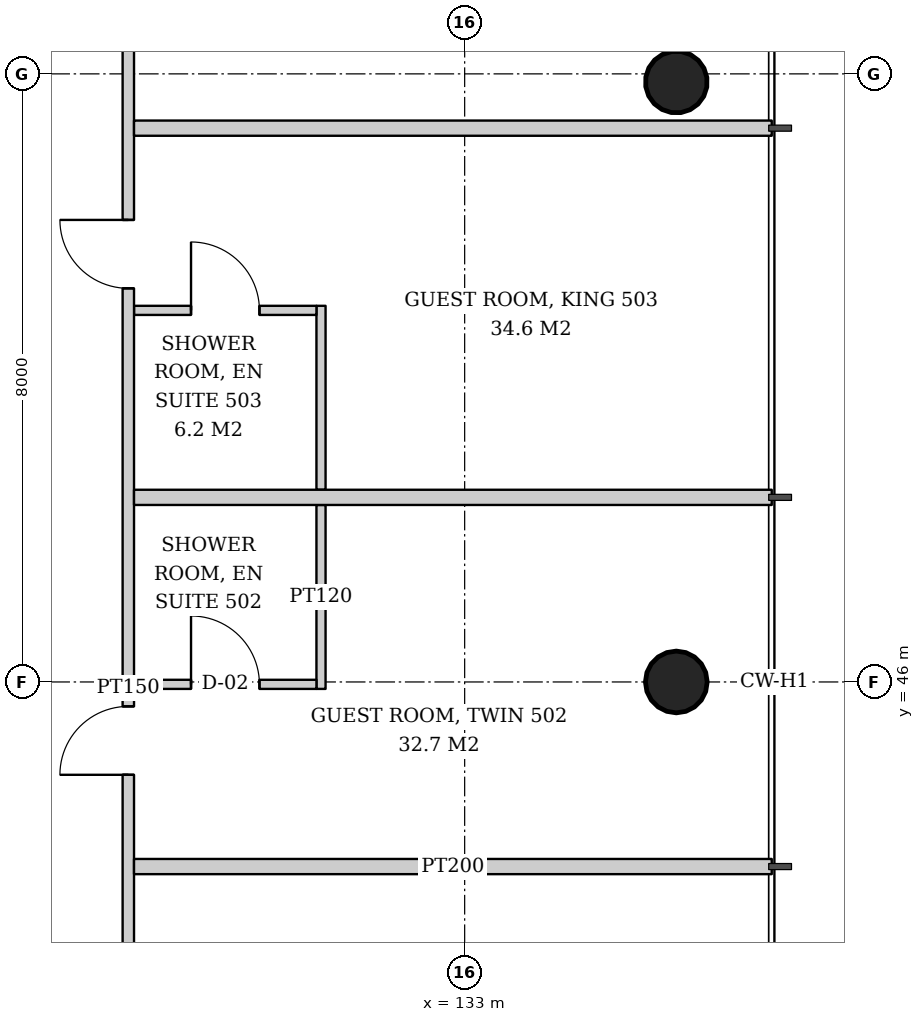
"""IFC4 building model, lengths in metres.
Left out: names, types, materials, properties, quantities, classifications, styles, units other than length and angle.
Written with IfcOpenShell. Run it as: python <this file> out.ifc"""

import sys

from ifc_helpers import new_model, si_unit, direction, frame, frame_2d, origin, origin_2d, place, context, subcontext, project, spatial, rectangle, hollow_circle, extrude, element, fill, save


model = new_model("IFC4")
c1 = context("Model", 3, precision=1e-05, world=origin(), true_north=direction((0.0, 1.0)))
c2 = subcontext(c1, "Body", "Model", "MODEL_VIEW")
j1 = project(units=[si_unit("LENGTHUNIT", "METRE"), si_unit("PLANEANGLEUNIT", "RADIAN")], contexts=[c1])
p1 = place(None, origin())
s1 = spatial("IfcSite", under=j1, at=p1, CompositionType="ELEMENT")
p2 = place(p1, origin())
s2 = spatial("IfcBuilding", under=s1, at=p2, CompositionType="ELEMENT")
p3 = place(p2, frame((0.0, 0.0, 24.8)))
s3 = spatial("IfcBuildingStorey", under=s2, at=p3, CompositionType="ELEMENT", Elevation=24.8)
p4 = place(p3, frame((135.836, 46.0, 0.0), z_axis=(-0.043069538298, 0.0, 0.999072076915), x_axis=(0.0, -1.0, 0.0)))
e1 = element("IfcColumn", 1, at=p4, inside=s3, PredefinedType="COLUMN", context=c2, shape_type="SweptSolid", body=[
    extrude(hollow_circle(Radius=0.406, WallThickness=0.03, at=origin_2d()), origin(), (0.0, 0.0, 1.0), 3.803),
])
p5 = place(p3, frame((135.836, 53.918, 0.0), z_axis=(-0.043059525333, -0.021561848751, 0.998839808957), x_axis=(0.44774654769, -0.894160516368, 0.0)))
e2 = element("IfcColumn", 2, at=p5, inside=s3, PredefinedType="COLUMN", context=c2, shape_type="SweptSolid", body=[
    extrude(hollow_circle(Radius=0.406, WallThickness=0.03, at=origin_2d()), origin(), (0.0, 0.0, 1.0), 3.804),
])
p6 = place(p3, frame((131.11, 45.909, 0.0), z_axis=(0.0, 0.0, 1.0), x_axis=(0.0, 1.0, 0.0)))
e3 = element("IfcWall", 3, at=p6, inside=s3, PredefinedType="PARTITIONING", context=c2, shape_type="SweptSolid", body=[
    extrude(rectangle(XDim=2.42, YDim=0.12, at=frame_2d((1.21, 0.0))), origin(), (0.0, 0.0, 1.0), 3.6),
])
p7 = place(p3, frame((128.65, 45.969, 0.0), z_axis=(0.0, 0.0, 1.0), x_axis=(1.0, 0.0, 0.0)))
e4 = element("IfcWall", 4, at=p7, inside=s3, PredefinedType="PARTITIONING", context=c2, shape_type="SweptSolid", body=[
    extrude(rectangle(XDim=2.4, YDim=0.12, at=frame_2d((1.2, 0.0))), origin(), (0.0, 0.0, 1.0), 3.6),
])
p8 = place(p7, frame((0.75, 0.0, 0.0)))
e5 = element("IfcOpeningElement", 5, at=p8, cuts=e4, PredefinedType="OPENING", context=c2, shape_type="SweptSolid", body=[
    extrude(rectangle(XDim=0.9, YDim=2.1, at=frame_2d((0.45, 1.05))), frame((0.0, 0.07, 0.0), z_axis=(0.0, -1.0, 0.0), x_axis=(1.0, 0.0, 0.0)), (0.0, 0.0, 1.0), 0.14),
])
p9 = place(p3, frame((131.11, 48.529, 0.0), z_axis=(0.0, 0.0, 1.0), x_axis=(0.0, 1.0, 0.0)))
e6 = element("IfcWall", 6, at=p9, inside=s3, PredefinedType="PARTITIONING", context=c2, shape_type="SweptSolid", body=[
    extrude(rectangle(XDim=2.42, YDim=0.12, at=frame_2d((1.21, 0.0))), origin(), (0.0, 0.0, 1.0), 2.847),
])
p10 = place(p3, frame((128.65, 50.889, 0.0), z_axis=(0.0, 0.0, 1.0), x_axis=(1.0, 0.0, 0.0)))
e7 = element("IfcWall", 7, at=p10, inside=s3, PredefinedType="PARTITIONING", context=c2, shape_type="SweptSolid", body=[
    extrude(rectangle(XDim=2.4, YDim=0.12, at=frame_2d((1.2, 0.0))), origin(), (0.0, 0.0, 1.0), 3.6),
])
p11 = place(p10, frame((0.75, 0.0, 0.0)))
e8 = element("IfcOpeningElement", 8, at=p11, cuts=e7, PredefinedType="OPENING", context=c2, shape_type="SweptSolid", body=[
    extrude(rectangle(XDim=0.9, YDim=2.1, at=frame_2d((0.45, 1.05))), frame((0.0, 0.07, 0.0), z_axis=(0.0, -1.0, 0.0), x_axis=(1.0, 0.0, 0.0)), (0.0, 0.0, 1.0), 0.14),
])
p12 = place(p3, frame((128.575, 34.35, 0.0), z_axis=(0.0, 0.0, 1.0), x_axis=(0.0, 1.0, 0.0)))
e9 = element("IfcWall", 9, at=p12, inside=s3, PredefinedType="PARTITIONING", context=c2, shape_type="SweptSolid", body=[
    extrude(rectangle(XDim=23.15, YDim=0.15, at=frame_2d((11.575, 0.0))), origin(), (0.0, 0.0, 1.0), 2.8),
])
p13 = place(p12, frame((1.757, 0.0, 0.0)))
e10 = element("IfcOpeningElement", 10, at=p13, cuts=e9, PredefinedType="OPENING", context=c2, shape_type="SweptSolid", body=[
    extrude(rectangle(XDim=0.9, YDim=2.1, at=frame_2d((0.45, 1.05))), frame((0.0, 0.085, 0.0), z_axis=(0.0, -1.0, 0.0), x_axis=(1.0, 0.0, 0.0)), (0.0, 0.0, 1.0), 0.17),
])
p14 = place(p12, frame((10.428, 0.0, 0.0)))
e11 = element("IfcOpeningElement", 11, at=p14, cuts=e9, PredefinedType="OPENING", context=c2, shape_type="SweptSolid", body=[
    extrude(rectangle(XDim=0.9, YDim=2.1, at=frame_2d((0.45, 1.05))), frame((0.0, 0.085, 0.0), z_axis=(0.0, -1.0, 0.0), x_axis=(1.0, 0.0, 0.0)), (0.0, 0.0, 1.0), 0.17),
])
p15 = place(p12, frame((16.829, 0.0, 0.0)))
e12 = element("IfcOpeningElement", 12, at=p15, cuts=e9, PredefinedType="OPENING", context=c2, shape_type="SweptSolid", body=[
    extrude(rectangle(XDim=0.9, YDim=2.1, at=frame_2d((0.45, 1.05))), frame((0.0, 0.085, 0.0), z_axis=(0.0, -1.0, 0.0), x_axis=(1.0, 0.0, 0.0)), (0.0, 0.0, 1.0), 0.17),
])
for number, where, z_axis, x_axis in (
    (13, (128.65, 43.572, 0.0), (0.0, 0.0, 1.0), (1.0, 0.0, 0.0)),
    (14, (128.65, 48.428, 0.0), (0.0, 0.0, 1.0), (1.0, 0.0, 0.0)),
    (15, (128.65, 53.286, 0.0), (0.0, 0.0, 1.0), (1.0, 0.0, 0.0)),
):
    element("IfcWall", number, at=place(p3, frame(where, z_axis=z_axis, x_axis=x_axis)), inside=s3, PredefinedType="PARTITIONING", context=c2, shape_type="SweptSolid", body=[
        extrude(rectangle(XDim=8.39, YDim=0.2, at=frame_2d((4.195, 0.0))), origin(), (0.0, 0.0, 1.0), 3.05),
    ])
p16 = place(p8, origin())
e16 = element("IfcDoor", 16, at=p16, inside=s3, OperationType="SINGLE_SWING_LEFT", PredefinedType="DOOR", context=c2, shape_type="SweptSolid", body=[
    extrude(rectangle(XDim=0.9, YDim=2.1, at=frame_2d((0.45, 1.05))), frame((0.0, 0.025, 0.0), z_axis=(0.0, -1.0, 0.0), x_axis=(1.0, 0.0, 0.0)), (0.0, 0.0, 1.0), 0.05),
])
fill(e5, e16)
p17 = place(p11, origin())
e17 = element("IfcDoor", 17, at=p17, inside=s3, OperationType="SINGLE_SWING_LEFT", PredefinedType="DOOR", context=c2, shape_type="SweptSolid", body=[
    extrude(rectangle(XDim=0.9, YDim=2.1, at=frame_2d((0.45, 1.05))), frame((0.0, 0.025, 0.0), z_axis=(0.0, -1.0, 0.0), x_axis=(1.0, 0.0, 0.0)), (0.0, 0.0, 1.0), 0.05),
])
fill(e8, e17)
p18 = place(p14, origin())
e18 = element("IfcDoor", 18, at=p18, inside=s3, OperationType="SINGLE_SWING_LEFT", PredefinedType="DOOR", context=c2, shape_type="SweptSolid", body=[
    extrude(rectangle(XDim=0.9, YDim=2.1, at=frame_2d((0.45, 1.05))), frame((0.0, 0.025, 0.0), z_axis=(0.0, -1.0, 0.0), x_axis=(1.0, 0.0, 0.0)), (0.0, 0.0, 1.0), 0.05),
])
fill(e11, e18)
p19 = place(p15, origin())
e19 = element("IfcDoor", 19, at=p19, inside=s3, OperationType="SINGLE_SWING_RIGHT", PredefinedType="DOOR", context=c2, shape_type="SweptSolid", body=[
    extrude(rectangle(XDim=0.9, YDim=2.1, at=frame_2d((0.45, 1.05))), frame((0.0, 0.025, 0.0), z_axis=(0.0, -1.0, 0.0), x_axis=(1.0, 0.0, 0.0)), (0.0, 0.0, 1.0), 0.05),
])
fill(e12, e19)
save(model, sys.argv[1])
